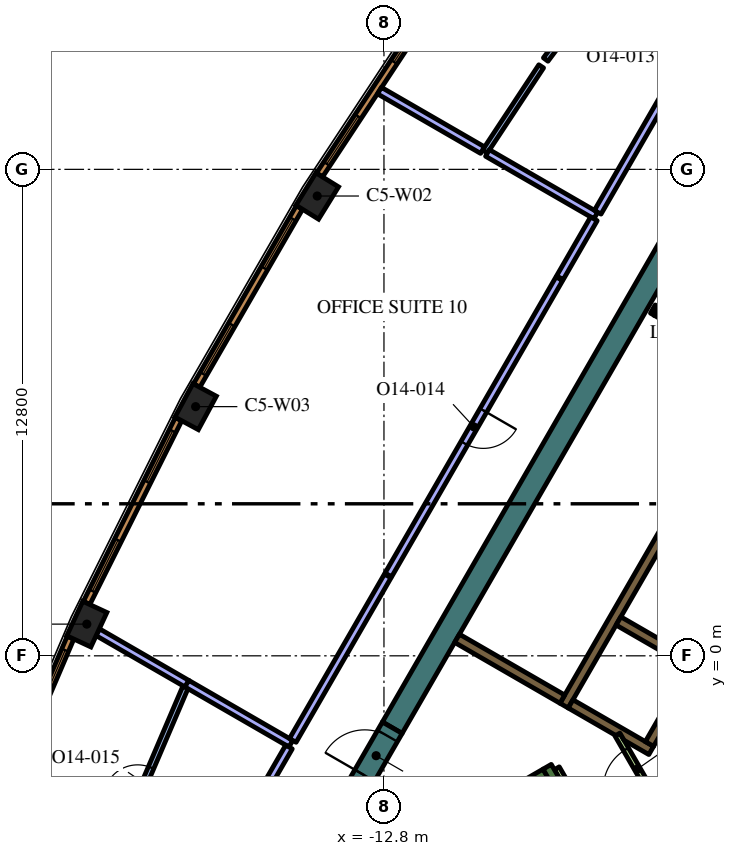
"""IFC4 building model, lengths in metres.
Left out: names, types, materials, properties, quantities, classifications, styles, units other than length and angle.
Written with IfcOpenShell. Run it as: python <this file> out.ifc"""

import sys

from ifc_helpers import new_model, si_unit, direction, frame, frame_2d, origin, origin_2d, place, context, subcontext, project, spatial, polyline, rectangle, outline, extrude, element, fill, save


model = new_model("IFC4")
c1 = context("Model", 3, precision=1e-05, world=origin(), true_north=direction((0.0, 1.0)))
c2 = subcontext(c1, "Body", "Model", "MODEL_VIEW")
j1 = project(units=[si_unit("LENGTHUNIT", "METRE"), si_unit("PLANEANGLEUNIT", "RADIAN")], contexts=[c1])
p1 = place(None, origin())
s1 = spatial("IfcSite", under=j1, at=p1, CompositionType="ELEMENT")
p2 = place(p1, origin())
s2 = spatial("IfcBuilding", under=s1, at=p2, CompositionType="ELEMENT")
p3 = place(p2, frame((0.0, 0.0, 309.0)))
s3 = spatial("IfcBuildingStorey", under=s2, at=p3, CompositionType="ELEMENT", Elevation=309.0)
for number, where, z_axis, x_axis in (
    (1, (-14.556, 12.098, 0.0), (0.0, 0.0, 1.0), (-0.526, -0.851, 0.0)),
    (2, (-17.756, 6.557, 0.0), (0.0, 0.0, 1.0), (-0.474, -0.881, 0.0)),
    (3, (-20.619, 0.834, 0.0), (0.0, 0.0, 1.0), (-0.421, -0.907, 0.0)),
):
    element("IfcColumn", number, at=place(p3, frame(where, z_axis=z_axis, x_axis=x_axis)), inside=s3, PredefinedType="COLUMN", context=c2, shape_type="SweptSolid", body=[
        extrude(rectangle(XDim=1.0, YDim=0.7, at=origin_2d()), origin(), (0.0, 0.0, 1.0), 4.2),
    ])
p4 = place(p3, frame((-12.582, -1.892, 0.0), z_axis=(0.0, 0.0, 1.0), x_axis=(0.500003640647, 0.866023301845, 0.0)))
e4 = element("IfcWall", 4, at=p4, inside=s3, PredefinedType="SOLIDWALL", context=c2, shape_type="SweptSolid", body=[
    extrude(rectangle(XDim=15.858, YDim=0.6, at=frame_2d((7.929, 0.0))), origin(), (0.0, 0.0, 1.0), 4.2),
])
p5 = place(p3, frame((-14.44, -6.49, 0.0), z_axis=(0.0, 0.0, 1.0), x_axis=(0.866022966069, 0.500004222222, 0.0)))
e5 = element("IfcWall", 5, at=p5, inside=s3, PredefinedType="SOLIDWALL", context=c2, shape_type="SweptSolid", body=[
    extrude(rectangle(XDim=6.8, YDim=0.25, at=frame_2d((3.4, 0.0))), origin(), (0.0, 0.0, 1.0), 4.2),
])
p6 = place(p3, frame((-8.168, -3.503, 0.0), z_axis=(0.0, 0.0, 1.0), x_axis=(-0.499952099219, 0.866053057547, 0.0)))
e6 = element("IfcWall", 6, at=p6, inside=s3, PredefinedType="SOLIDWALL", context=c2, shape_type="SweptSolid", body=[
    extrude(rectangle(XDim=0.675, YDim=0.25, at=frame_2d((0.337, 0.0))), origin(), (0.0, 0.0, 1.0), 4.2),
])
p7 = place(p3, frame((-8.06, -1.311, 0.0), z_axis=(0.0, 0.0, 1.0), x_axis=(0.50000273126, 0.866023826885, 0.0)))
e7 = element("IfcWall", 7, at=p7, inside=s3, PredefinedType="SOLIDWALL", context=c2, shape_type="SweptSolid", body=[
    extrude(rectangle(XDim=10.33, YDim=0.25, at=frame_2d((5.165, 0.0))), origin(), (0.0, 0.0, 1.0), 4.2),
])
p8 = place(p3, frame((-4.724, -0.182, 0.0), z_axis=(0.0, 0.0, 1.0), x_axis=(-0.866008176907, 0.50002983664, 0.0)))
e8 = element("IfcWall", 8, at=p8, inside=s3, PredefinedType="SOLIDWALL", context=c2, shape_type="SweptSolid", body=[
    extrude(rectangle(XDim=2.2, YDim=0.25, at=frame_2d((1.1, 0.0))), origin(), (0.0, 0.0, 1.0), 4.2),
])
p9 = place(p3, origin())
e9 = element("IfcWall", 9, at=p9, inside=s3, PredefinedType="SOLIDWALL", context=c2, shape_type="SweptSolid", body=[
    extrude(outline(polyline([(-5.922, -2.257), (-5.922, -2.257), (-5.705, -2.382), (-5.83, -2.598), (-6.483, -2.221), (-6.591, -2.033), (-6.591, -2.033), (-6.7, -2.096), (-7.952, -1.373), (-7.827, -1.156), (-5.922, -2.257)])), origin(), (0.0, 0.0, 1.0), 4.2),
])
p10 = place(p3, frame((-8.106, -1.14, 0.0), z_axis=(0.0, 0.0, 1.0), x_axis=(-0.866008981251, 0.500028443584, 0.0)))
e10 = element("IfcWall", 10, at=p10, inside=s3, PredefinedType="SOLIDWALL", context=c2, shape_type="SweptSolid", body=[
    extrude(rectangle(XDim=3.2, YDim=0.25, at=frame_2d((1.6, 0.0))), origin(), (0.0, 0.0, 1.0), 4.2),
])
p11 = place(p3, frame((-5.725, 9.125, 0.0), z_axis=(0.0, 0.0, 1.0), x_axis=(0.866185586049, -0.49972245349, 0.0)))
e11 = element("IfcWall", 11, at=p11, inside=s3, PredefinedType="SOLIDWALL", context=c2, shape_type="SweptSolid", body=[
    extrude(rectangle(XDim=0.11, YDim=0.25, at=frame_2d((0.055, 0.0))), origin(), (0.0, 0.0, 1.0), 4.2),
])
e12 = element("IfcWall", 12, at=p9, inside=s3, PredefinedType="SOLIDWALL", context=c2, shape_type="SweptSolid", body=[
    extrude(outline(polyline([(-5.689, 8.96), (-5.69, 8.961), (-5.565, 9.177), (-5.319, 9.035), (-5.335, 9.026), (-5.351, 9.015), (-5.366, 9.002), (-5.379, 8.988), (-5.392, 8.972), (-5.402, 8.956), (-5.412, 8.939), (-5.629, 9.064), (-5.629, 9.064), (-5.689, 8.96)])), origin(), (0.0, 0.0, 1.0), 4.2),
])
p12 = place(p3, frame((-8.252, -2.958, 0.0), z_axis=(0.0, 0.0, 1.0), x_axis=(0.500174715838, -0.865924508047, 0.0)))
e13 = element("IfcWall", 13, at=p12, inside=s3, PredefinedType="PARTITIONING", context=c2, shape_type="SweptSolid", body=[
    extrude(rectangle(XDim=0.514, YDim=0.15, at=frame_2d((0.257, 0.0))), origin(), (0.0, 0.0, 1.0), 3.55),
])
p13 = place(p3, frame((-0.898, 6.194, 0.0), z_axis=(0.0, 0.0, 1.0), x_axis=(-0.499996202215, -0.866027596426, 0.0)))
e14 = element("IfcWall", 14, at=p13, inside=s3, PredefinedType="SOLIDWALL", context=c2, shape_type="SweptSolid", body=[
    extrude(rectangle(XDim=9.83, YDim=0.25, at=frame_2d((4.915, 0.0))), origin(), (0.0, 0.0, 1.0), 4.2),
])
p14 = place(p13, frame((0.585, 0.0, 0.0)))
e15 = element("IfcOpeningElement", 15, at=p14, cuts=e14, PredefinedType="OPENING", context=c2, shape_type="SweptSolid", body=[
    extrude(rectangle(XDim=1.1, YDim=2.1, at=frame_2d((0.55, 1.05))), frame((0.0, 0.135, 0.0), z_axis=(0.0, -1.0, 0.0), x_axis=(1.0, 0.0, 0.0)), (0.0, 0.0, 1.0), 0.27),
])
p15 = place(p13, frame((3.105, 0.0, 0.0)))
e16 = element("IfcOpeningElement", 16, at=p15, cuts=e14, PredefinedType="OPENING", context=c2, shape_type="SweptSolid", body=[
    extrude(rectangle(XDim=1.1, YDim=2.1, at=frame_2d((0.55, 1.05))), frame((0.0, 0.135, 0.0), z_axis=(0.0, -1.0, 0.0), x_axis=(1.0, 0.0, 0.0)), (0.0, 0.0, 1.0), 0.27),
])
p16 = place(p13, frame((5.625, 0.0, 0.0)))
e17 = element("IfcOpeningElement", 17, at=p16, cuts=e14, PredefinedType="OPENING", context=c2, shape_type="SweptSolid", body=[
    extrude(rectangle(XDim=1.1, YDim=2.1, at=frame_2d((0.55, 1.05))), frame((0.0, 0.135, 0.0), z_axis=(0.0, -1.0, 0.0), x_axis=(1.0, 0.0, 0.0)), (0.0, 0.0, 1.0), 0.27),
])
p17 = place(p13, frame((8.145, 0.0, 0.0)))
e18 = element("IfcOpeningElement", 18, at=p17, cuts=e14, PredefinedType="OPENING", context=c2, shape_type="SweptSolid", body=[
    extrude(rectangle(XDim=1.1, YDim=2.1, at=frame_2d((0.55, 1.05))), frame((0.0, 0.135, 0.0), z_axis=(0.0, -1.0, 0.0), x_axis=(1.0, 0.0, 0.0)), (0.0, 0.0, 1.0), 0.27),
])
p18 = place(p3, frame((-5.606, -3.89, 0.0), z_axis=(0.0, 0.0, 1.0), x_axis=(-0.500027713859, 0.866009402589, 0.0)))
e19 = element("IfcWall", 19, at=p18, inside=s3, PredefinedType="PARTITIONING", context=c2, shape_type="SweptSolid", body=[
    extrude(rectangle(XDim=2.1, YDim=0.15, at=frame_2d((1.05, 0.0))), origin(), (0.0, 0.0, 1.0), 3.55),
])
p19 = place(p18, frame((0.45, 0.0, 0.0)))
e20 = element("IfcOpeningElement", 20, at=p19, cuts=e19, PredefinedType="OPENING", context=c2, shape_type="SweptSolid", body=[
    extrude(rectangle(XDim=1.2, YDim=2.1, at=frame_2d((0.6, 1.05))), frame((0.0, 0.085, 0.0), z_axis=(0.0, -1.0, 0.0), x_axis=(1.0, 0.0, 0.0)), (0.0, 0.0, 1.0), 0.17),
])
p20 = place(p3, frame((-5.659, 9.012, 0.0), z_axis=(0.0, 0.0, 1.0), x_axis=(0.866009402589, -0.500027713859, 0.0)))
e21 = element("IfcWall", 21, at=p20, inside=s3, PredefinedType="PARTITIONING", context=c2, shape_type="SweptSolid", body=[
    extrude(rectangle(XDim=2.1, YDim=0.12, at=frame_2d((1.05, 0.0))), origin(), (0.0, 0.0, 1.0), 3.55),
])
p21 = place(p20, frame((0.45, 0.0, 0.0)))
e22 = element("IfcOpeningElement", 22, at=p21, cuts=e21, PredefinedType="OPENING", context=c2, shape_type="SweptSolid", body=[
    extrude(rectangle(XDim=1.2, YDim=2.1, at=frame_2d((0.6, 1.05))), frame((0.0, 0.07, 0.0), z_axis=(0.0, -1.0, 0.0), x_axis=(1.0, 0.0, 0.0)), (0.0, 0.0, 1.0), 0.14),
])
p22 = place(p3, frame((-13.432, -3.364, 0.0), z_axis=(0.0, 0.0, 1.0), x_axis=(0.500062241894, 0.865989465428, 0.0)))
e23 = element("IfcWall", 23, at=p22, inside=s3, PredefinedType="SOLIDWALL", context=c2, shape_type="SweptSolid", body=[
    extrude(rectangle(XDim=1.7, YDim=0.6, at=frame_2d((0.85, 0.0))), origin(), (0.0, 0.0, 1.0), 4.2),
])
p23 = place(p22, frame((0.25, 0.0, 0.0)))
e24 = element("IfcOpeningElement", 24, at=p23, cuts=e23, PredefinedType="OPENING", context=c2, shape_type="SweptSolid", body=[
    extrude(rectangle(XDim=1.2, YDim=2.1, at=frame_2d((0.6, 1.05))), frame((0.0, 0.31, 0.0), z_axis=(0.0, -1.0, 0.0), x_axis=(1.0, 0.0, 0.0)), (0.0, 0.0, 1.0), 0.62),
])
p24 = place(p3, frame((-8.544, 15.69, 0.0), z_axis=(0.0, 0.0, 1.0), x_axis=(0.599538824769, 0.800345673815, 0.0)))
e25 = element("IfcWall", 25, at=p24, inside=s3, PredefinedType="PARTITIONING", context=c2, shape_type="SweptSolid", body=[
    extrude(rectangle(XDim=3.474, YDim=0.15, at=frame_2d((1.737, 0.0))), origin(), (0.0, 0.0, 1.0), 3.55),
])
p25 = place(p24, frame((1.274, 0.0, 0.0)))
e26 = element("IfcOpeningElement", 26, at=p25, cuts=e25, PredefinedType="OPENING", context=c2, shape_type="SweptSolid", body=[
    extrude(rectangle(XDim=0.9, YDim=2.1, at=frame_2d((0.45, 1.05))), frame((0.0, 0.085, 0.0), z_axis=(0.0, -1.0, 0.0), x_axis=(1.0, 0.0, 0.0)), (0.0, 0.0, 1.0), 0.17),
])
p26 = place(p3, frame((-8.662, 15.511, 0.0), z_axis=(0.0, 0.0, 1.0), x_axis=(-0.550792824442, -0.834641997831, 0.0)))
e27 = element("IfcWall", 27, at=p26, inside=s3, PredefinedType="PARTITIONING", context=c2, shape_type="SweptSolid", body=[
    extrude(rectangle(XDim=2.686, YDim=0.15, at=frame_2d((1.343, 0.0))), origin(), (0.0, 0.0, 1.0), 3.55),
])
p27 = place(p3, frame((-10.207, 13.306, 0.0), z_axis=(0.0, 0.0, 1.0), x_axis=(-0.866041434906, 0.499972232254, 0.0)))
e28 = element("IfcWall", 28, at=p27, inside=s3, PredefinedType="PARTITIONING", context=c2, shape_type="SweptSolid", body=[
    extrude(rectangle(XDim=3.131, YDim=0.2, at=frame_2d((1.565, 0.0))), origin(), (0.0, 0.0, 1.0), 3.55),
])
p28 = place(p3, frame((-7.226, 11.585, 0.0), z_axis=(0.0, 0.0, 1.0), x_axis=(-0.866034923029, 0.499983511822, 0.0)))
e29 = element("IfcWall", 29, at=p28, inside=s3, PredefinedType="PARTITIONING", context=c2, shape_type="SweptSolid", body=[
    extrude(rectangle(XDim=3.292, YDim=0.2, at=frame_2d((1.646, 0.0))), origin(), (0.0, 0.0, 1.0), 3.55),
])
p29 = place(p3, frame((-3.306, 18.374, 0.0), z_axis=(0.0, 0.0, 1.0), x_axis=(-0.500000072396, -0.866025361987, 0.0)))
e30 = element("IfcWall", 30, at=p29, inside=s3, PredefinedType="PARTITIONING", context=c2, shape_type="SweptSolid", body=[
    extrude(rectangle(XDim=7.739, YDim=0.2, at=frame_2d((3.87, 0.0))), origin(), (0.0, 0.0, 1.0), 3.55),
])
p30 = place(p29, frame((3.4, 0.0, 0.0)))
e31 = element("IfcOpeningElement", 31, at=p30, cuts=e30, PredefinedType="OPENING", context=c2, shape_type="SweptSolid", body=[
    extrude(rectangle(XDim=1.0, YDim=2.1, at=frame_2d((0.5, 1.05))), frame((0.0, 0.11, 0.0), z_axis=(0.0, -1.0, 0.0), x_axis=(1.0, 0.0, 0.0)), (0.0, 0.0, 1.0), 0.22),
])
p31 = place(p3, frame((-17.98, -0.736, 0.0), z_axis=(0.0, 0.0, 1.0), x_axis=(-0.866049350164, 0.49995852136, 0.0)))
e32 = element("IfcWall", 32, at=p31, inside=s3, PredefinedType="PARTITIONING", context=c2, shape_type="SweptSolid", body=[
    extrude(rectangle(XDim=2.716, YDim=0.2, at=frame_2d((1.358, 0.0))), origin(), (0.0, 0.0, 1.0), 3.55),
])
p32 = place(p3, frame((-15.249, -2.312, 0.0), z_axis=(0.0, 0.0, 1.0), x_axis=(-0.866053113424, 0.499952002425, 0.0)))
e33 = element("IfcWall", 33, at=p32, inside=s3, PredefinedType="PARTITIONING", context=c2, shape_type="SweptSolid", body=[
    extrude(rectangle(XDim=3.161, YDim=0.2, at=frame_2d((1.581, 0.0))), origin(), (0.0, 0.0, 1.0), 3.55),
])
p33 = place(p3, frame((-8.186, 9.922, 0.0), z_axis=(0.0, 0.0, 1.0), x_axis=(-0.5000018851, -0.866024315419, 0.0)))
e34 = element("IfcWall", 34, at=p33, inside=s3, PredefinedType="PARTITIONING", context=c2, shape_type="SweptSolid", body=[
    extrude(rectangle(XDim=9.0, YDim=0.2, at=frame_2d((4.5, 0.0))), origin(), (0.0, 0.0, 1.0), 3.55),
])
p34 = place(p33, frame((4.0, 0.0, 0.0)))
e35 = element("IfcOpeningElement", 35, at=p34, cuts=e34, PredefinedType="OPENING", context=c2, shape_type="SweptSolid", body=[
    extrude(rectangle(XDim=1.0, YDim=2.1, at=frame_2d((0.5, 1.05))), frame((0.0, 0.11, 0.0), z_axis=(0.0, -1.0, 0.0), x_axis=(1.0, 0.0, 0.0)), (0.0, 0.0, 1.0), 0.22),
])
p35 = place(p3, frame((-12.701, 2.102, 0.0), z_axis=(0.0, 0.0, 1.0), x_axis=(-0.499974782844, -0.866039962427, 0.0)))
e36 = element("IfcWall", 36, at=p35, inside=s3, PredefinedType="PARTITIONING", context=c2, shape_type="SweptSolid", body=[
    extrude(rectangle(XDim=4.997, YDim=0.2, at=frame_2d((2.499, 0.0))), origin(), (0.0, 0.0, 1.0), 3.55),
])
p36 = place(p3, frame((-7.275, 11.499, 0.0), z_axis=(0.0, 0.0, 1.0), x_axis=(-0.500025407441, -0.866010734295, 0.0)))
e37 = element("IfcWall", 37, at=p36, inside=s3, PredefinedType="PARTITIONING", context=c2, shape_type="SweptSolid", body=[
    extrude(rectangle(XDim=1.791, YDim=0.2, at=frame_2d((0.895, 0.0))), origin(), (0.0, 0.0, 1.0), 3.55),
])
p37 = place(p3, frame((-20.188, -5.888, 0.0), z_axis=(0.0, 0.0, 1.0), x_axis=(0.393346486154, 0.919390309841, 0.0)))
e38 = element("IfcWall", 38, at=p37, inside=s3, PredefinedType="PARTITIONING", context=c2, shape_type="SweptSolid", body=[
    extrude(rectangle(XDim=5.505, YDim=0.15, at=frame_2d((2.752, 0.0))), origin(), (0.0, 0.0, 1.0), 3.55),
])
p38 = place(p37, frame((2.305, 0.0, 0.0)))
e39 = element("IfcOpeningElement", 39, at=p38, cuts=e38, PredefinedType="OPENING", context=c2, shape_type="SweptSolid", body=[
    extrude(rectangle(XDim=0.9, YDim=2.1, at=frame_2d((0.45, 1.05))), frame((0.0, 0.085, 0.0), z_axis=(0.0, -1.0, 0.0), x_axis=(1.0, 0.0, 0.0)), (0.0, 0.0, 1.0), 0.17),
])
p39 = place(p3, frame((-15.299, -2.399, 0.0), z_axis=(0.0, 0.0, 1.0), x_axis=(-0.49998958839, -0.866031414847, 0.0)))
e40 = element("IfcWall", 40, at=p39, inside=s3, PredefinedType="PARTITIONING", context=c2, shape_type="SweptSolid", body=[
    extrude(rectangle(XDim=4.562, YDim=0.2, at=frame_2d((2.281, 0.0))), origin(), (0.0, 0.0, 1.0), 3.55),
])
p40 = place(p39, frame((1.8, 0.0, 0.0)))
e41 = element("IfcOpeningElement", 41, at=p40, cuts=e40, PredefinedType="OPENING", context=c2, shape_type="SweptSolid", body=[
    extrude(rectangle(XDim=1.0, YDim=2.1, at=frame_2d((0.5, 1.05))), frame((0.0, 0.11, 0.0), z_axis=(0.0, -1.0, 0.0), x_axis=(1.0, 0.0, 0.0)), (0.0, 0.0, 1.0), 0.22),
])
p41 = place(p3, frame((-11.518, 17.166, 0.0), z_axis=(0.0, 0.0, 1.0), x_axis=(-0.550744054781, -0.83467417962, 0.0)))
e42 = element("IfcWall", 42, at=p41, inside=s3, PredefinedType="SOLIDWALL", context=c2, shape_type="SweptSolid", body=[
    extrude(rectangle(XDim=5.406, YDim=0.19, at=frame_2d((2.703, 0.0))), origin(), (0.0, 0.0, 1.0), 3.95),
])
p42 = place(p41, frame((0.346, 0.0, 0.6)))
e43 = element("IfcOpeningElement", 43, at=p42, cuts=e42, PredefinedType="OPENING", context=c2, shape_type="SweptSolid", body=[
    extrude(rectangle(XDim=1.5, YDim=2.85, at=frame_2d((0.75, 1.425))), frame((0.0, 0.105, 0.0), z_axis=(0.0, -1.0, 0.0), x_axis=(1.0, 0.0, 0.0)), (0.0, 0.0, 1.0), 0.21),
])
p43 = place(p41, frame((3.559, 0.0, 0.6)))
e44 = element("IfcOpeningElement", 44, at=p43, cuts=e42, PredefinedType="OPENING", context=c2, shape_type="SweptSolid", body=[
    extrude(rectangle(XDim=1.5, YDim=2.85, at=frame_2d((0.75, 1.425))), frame((0.0, 0.105, 0.0), z_axis=(0.0, -1.0, 0.0), x_axis=(1.0, 0.0, 0.0)), (0.0, 0.0, 1.0), 0.21),
])
p44 = place(p3, frame((-15.025, 11.796, 0.0), z_axis=(0.0, 0.0, 1.0), x_axis=(-0.500024767483, -0.866011103799, 0.0)))
e45 = element("IfcWall", 45, at=p44, inside=s3, PredefinedType="SOLIDWALL", context=c2, shape_type="SweptSolid", body=[
    extrude(rectangle(XDim=5.406, YDim=0.19, at=frame_2d((2.703, 0.0))), origin(), (0.0, 0.0, 1.0), 3.95),
])
p45 = place(p44, frame((0.346, 0.0, 0.6)))
e46 = element("IfcOpeningElement", 46, at=p45, cuts=e45, PredefinedType="OPENING", context=c2, shape_type="SweptSolid", body=[
    extrude(rectangle(XDim=1.5, YDim=2.85, at=frame_2d((0.75, 1.425))), frame((0.0, 0.105, 0.0), z_axis=(0.0, -1.0, 0.0), x_axis=(1.0, 0.0, 0.0)), (0.0, 0.0, 1.0), 0.21),
])
p46 = place(p44, frame((3.559, 0.0, 0.6)))
e47 = element("IfcOpeningElement", 47, at=p46, cuts=e45, PredefinedType="OPENING", context=c2, shape_type="SweptSolid", body=[
    extrude(rectangle(XDim=1.5, YDim=2.85, at=frame_2d((0.75, 1.425))), frame((0.0, 0.105, 0.0), z_axis=(0.0, -1.0, 0.0), x_axis=(1.0, 0.0, 0.0)), (0.0, 0.0, 1.0), 0.21),
])
p47 = place(p3, frame((-18.206, 6.227, 0.0), z_axis=(0.0, 0.0, 1.0), x_axis=(-0.447484531401, -0.894291671747, 0.0)))
e48 = element("IfcWall", 48, at=p47, inside=s3, PredefinedType="SOLIDWALL", context=c2, shape_type="SweptSolid", body=[
    extrude(rectangle(XDim=5.406, YDim=0.19, at=frame_2d((2.703, 0.0))), origin(), (0.0, 0.0, 1.0), 3.95),
])
p48 = place(p47, frame((0.346, 0.0, 0.6)))
e49 = element("IfcOpeningElement", 49, at=p48, cuts=e48, PredefinedType="OPENING", context=c2, shape_type="SweptSolid", body=[
    extrude(rectangle(XDim=1.5, YDim=2.85, at=frame_2d((0.75, 1.425))), frame((0.0, 0.105, 0.0), z_axis=(0.0, -1.0, 0.0), x_axis=(1.0, 0.0, 0.0)), (0.0, 0.0, 1.0), 0.21),
])
p49 = place(p47, frame((3.559, 0.0, 0.6)))
e50 = element("IfcOpeningElement", 50, at=p49, cuts=e48, PredefinedType="OPENING", context=c2, shape_type="SweptSolid", body=[
    extrude(rectangle(XDim=1.5, YDim=2.85, at=frame_2d((0.75, 1.425))), frame((0.0, 0.105, 0.0), z_axis=(0.0, -1.0, 0.0), x_axis=(1.0, 0.0, 0.0)), (0.0, 0.0, 1.0), 0.21),
])
p50 = place(p3, frame((-21.049, 0.478, 0.0), z_axis=(0.0, 0.0, 1.0), x_axis=(-0.393347848476, -0.919389726992, 0.0)))
e51 = element("IfcWall", 51, at=p50, inside=s3, PredefinedType="SOLIDWALL", context=c2, shape_type="SweptSolid", body=[
    extrude(rectangle(XDim=5.415, YDim=0.19, at=frame_2d((2.708, 0.0))), origin(), (0.0, 0.0, 1.0), 3.95),
])
p51 = place(p50, frame((0.357, 0.0, 0.6)))
e52 = element("IfcOpeningElement", 52, at=p51, cuts=e51, PredefinedType="OPENING", context=c2, shape_type="SweptSolid", body=[
    extrude(rectangle(XDim=1.5, YDim=2.85, at=frame_2d((0.75, 1.425))), frame((0.0, 0.105, 0.0), z_axis=(0.0, -1.0, 0.0), x_axis=(1.0, 0.0, 0.0)), (0.0, 0.0, 1.0), 0.21),
])
p52 = place(p50, frame((3.593, 0.0, 0.6)))
e53 = element("IfcOpeningElement", 53, at=p52, cuts=e51, PredefinedType="OPENING", context=c2, shape_type="SweptSolid", body=[
    extrude(rectangle(XDim=1.5, YDim=2.85, at=frame_2d((0.75, 1.425))), frame((0.0, 0.105, 0.0), z_axis=(0.0, -1.0, 0.0), x_axis=(1.0, 0.0, 0.0)), (0.0, 0.0, 1.0), 0.21),
])
p53 = place(p19, origin())
e54 = element("IfcDoor", 54, at=p53, inside=s3, OperationType="SINGLE_SWING_LEFT", PredefinedType="DOOR", context=c2, shape_type="SweptSolid", body=[
    extrude(rectangle(XDim=1.2, YDim=2.1, at=frame_2d((0.6, 1.05))), frame((0.0, 0.025, 0.0), z_axis=(0.0, -1.0, 0.0), x_axis=(1.0, 0.0, 0.0)), (0.0, 0.0, 1.0), 0.05),
])
fill(e20, e54)
p54 = place(p23, origin())
e55 = element("IfcDoor", 55, at=p54, inside=s3, OperationType="SINGLE_SWING_LEFT", PredefinedType="DOOR", context=c2, shape_type="SweptSolid", body=[
    extrude(rectangle(XDim=1.2, YDim=2.1, at=frame_2d((0.6, 1.05))), frame((0.0, 0.025, 0.0), z_axis=(0.0, -1.0, 0.0), x_axis=(1.0, 0.0, 0.0)), (0.0, 0.0, 1.0), 0.05),
])
fill(e24, e55)
p55 = place(p34, origin())
e56 = element("IfcDoor", 56, at=p55, inside=s3, OperationType="SINGLE_SWING_LEFT", PredefinedType="DOOR", context=c2, shape_type="SweptSolid", body=[
    extrude(rectangle(XDim=1.0, YDim=2.1, at=frame_2d((0.5, 1.05))), frame((0.0, 0.025, 0.0), z_axis=(0.0, -1.0, 0.0), x_axis=(1.0, 0.0, 0.0)), (0.0, 0.0, 1.0), 0.05),
])
fill(e35, e56)
p56 = place(p38, origin())
e57 = element("IfcDoor", 57, at=p56, inside=s3, OperationType="SINGLE_SWING_RIGHT", PredefinedType="DOOR", context=c2, shape_type="SweptSolid", body=[
    extrude(rectangle(XDim=0.9, YDim=2.1, at=frame_2d((0.45, 1.05))), frame((0.0, 0.025, 0.0), z_axis=(0.0, -1.0, 0.0), x_axis=(1.0, 0.0, 0.0)), (0.0, 0.0, 1.0), 0.05),
])
fill(e39, e57)
p57 = place(p42, origin())
e58 = element("IfcWindow", 58, at=p57, inside=s3, PartitioningType="SINGLE_PANEL", PredefinedType="WINDOW", context=c2, shape_type="SweptSolid", body=[
    extrude(rectangle(XDim=1.5, YDim=2.85, at=frame_2d((0.75, 1.425))), frame((0.0, 0.045, 0.0), z_axis=(0.0, -1.0, 0.0), x_axis=(1.0, 0.0, 0.0)), (0.0, 0.0, 1.0), 0.06),
])
fill(e43, e58)
p58 = place(p43, origin())
e59 = element("IfcWindow", 59, at=p58, inside=s3, PartitioningType="SINGLE_PANEL", PredefinedType="WINDOW", context=c2, shape_type="SweptSolid", body=[
    extrude(rectangle(XDim=1.5, YDim=2.85, at=frame_2d((0.75, 1.425))), frame((0.0, 0.045, 0.0), z_axis=(0.0, -1.0, 0.0), x_axis=(1.0, 0.0, 0.0)), (0.0, 0.0, 1.0), 0.06),
])
fill(e44, e59)
p59 = place(p45, origin())
e60 = element("IfcWindow", 60, at=p59, inside=s3, PartitioningType="SINGLE_PANEL", PredefinedType="WINDOW", context=c2, shape_type="SweptSolid", body=[
    extrude(rectangle(XDim=1.5, YDim=2.85, at=frame_2d((0.75, 1.425))), frame((0.0, 0.045, 0.0), z_axis=(0.0, -1.0, 0.0), x_axis=(1.0, 0.0, 0.0)), (0.0, 0.0, 1.0), 0.06),
])
fill(e46, e60)
p60 = place(p46, origin())
e61 = element("IfcWindow", 61, at=p60, inside=s3, PartitioningType="SINGLE_PANEL", PredefinedType="WINDOW", context=c2, shape_type="SweptSolid", body=[
    extrude(rectangle(XDim=1.5, YDim=2.85, at=frame_2d((0.75, 1.425))), frame((0.0, 0.045, 0.0), z_axis=(0.0, -1.0, 0.0), x_axis=(1.0, 0.0, 0.0)), (0.0, 0.0, 1.0), 0.06),
])
fill(e47, e61)
p61 = place(p48, origin())
e62 = element("IfcWindow", 62, at=p61, inside=s3, PartitioningType="SINGLE_PANEL", PredefinedType="WINDOW", context=c2, shape_type="SweptSolid", body=[
    extrude(rectangle(XDim=1.5, YDim=2.85, at=frame_2d((0.75, 1.425))), frame((0.0, 0.045, 0.0), z_axis=(0.0, -1.0, 0.0), x_axis=(1.0, 0.0, 0.0)), (0.0, 0.0, 1.0), 0.06),
])
fill(e49, e62)
p62 = place(p49, origin())
e63 = element("IfcWindow", 63, at=p62, inside=s3, PartitioningType="SINGLE_PANEL", PredefinedType="WINDOW", context=c2, shape_type="SweptSolid", body=[
    extrude(rectangle(XDim=1.5, YDim=2.85, at=frame_2d((0.75, 1.425))), frame((0.0, 0.045, 0.0), z_axis=(0.0, -1.0, 0.0), x_axis=(1.0, 0.0, 0.0)), (0.0, 0.0, 1.0), 0.06),
])
fill(e50, e63)
p63 = place(p51, origin())
e64 = element("IfcWindow", 64, at=p63, inside=s3, PartitioningType="SINGLE_PANEL", PredefinedType="WINDOW", context=c2, shape_type="SweptSolid", body=[
    extrude(rectangle(XDim=1.5, YDim=2.85, at=frame_2d((0.75, 1.425))), frame((0.0, 0.045, 0.0), z_axis=(0.0, -1.0, 0.0), x_axis=(1.0, 0.0, 0.0)), (0.0, 0.0, 1.0), 0.06),
])
fill(e52, e64)
save(model, sys.argv[1])
